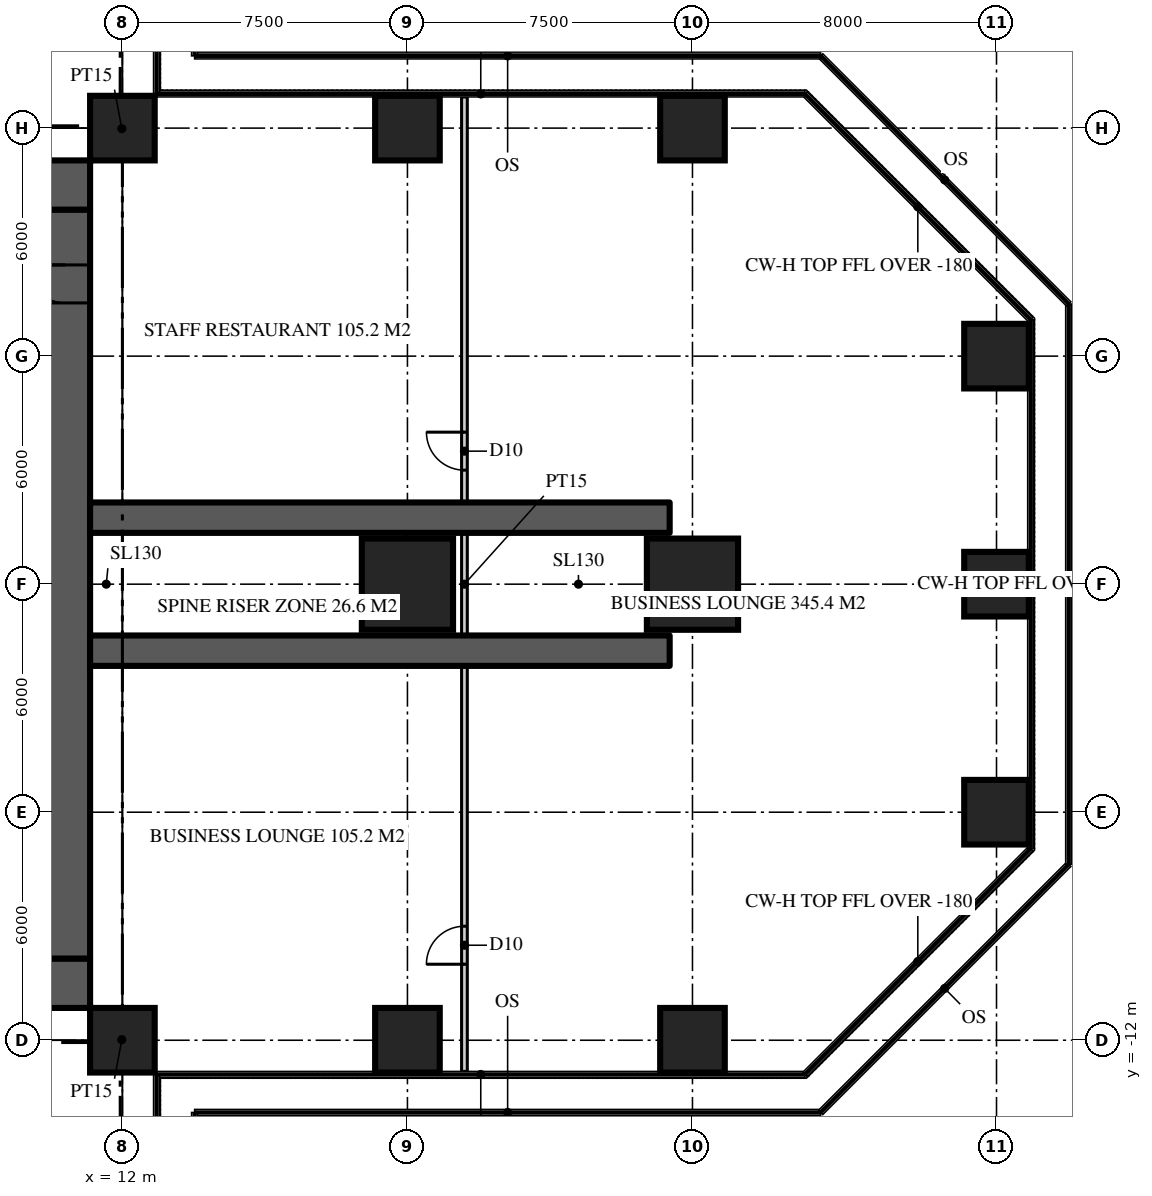
"""IFC4 building model, lengths in metres.
Left out: names, types, materials, properties, quantities, classifications, styles, units other than length and angle.
Written with IfcOpenShell. Run it as: python <this file> out.ifc"""

import sys

from ifc_helpers import new_model, si_unit, direction, frame, frame_2d, origin, origin_2d, place, context, subcontext, project, spatial, rectangle, extrude, element, fill, save


model = new_model("IFC4")
c1 = context("Model", 3, precision=1e-05, world=origin(), true_north=direction((0.0, 1.0)))
c2 = subcontext(c1, "Body", "Model", "MODEL_VIEW")
j1 = project(units=[si_unit("LENGTHUNIT", "METRE"), si_unit("PLANEANGLEUNIT", "RADIAN")], contexts=[c1])
p1 = place(None, origin())
s1 = spatial("IfcSite", under=j1, at=p1, CompositionType="ELEMENT")
p2 = place(p1, origin())
s2 = spatial("IfcBuilding", under=s1, at=p2, CompositionType="ELEMENT")
p3 = place(p2, frame((0.0, 0.0, 194.4)))
s3 = spatial("IfcBuildingStorey", under=s2, at=p3, CompositionType="ELEMENT", Elevation=194.4)
p4 = place(p3, frame((-11.15, 10.5, 0.0), z_axis=(0.0, 0.0, 1.0), x_axis=(1.0, 0.0, 0.0)))
e1 = element("IfcWall", 1, at=p4, inside=s3, PredefinedType="SHEAR", context=c2, shape_type="SweptSolid", body=[
    extrude(rectangle(XDim=22.3, YDim=1.3, at=frame_2d((11.15, 0.0))), origin(), (0.0, 0.0, 1.0), 4.5),
])
p5 = place(p4, frame((4.25, 0.0, 0.0)))
e2 = element("IfcOpeningElement", 2, at=p5, cuts=e1, PredefinedType="OPENING", context=c2, shape_type="SweptSolid", body=[
    extrude(rectangle(XDim=1.8, YDim=2.2, at=frame_2d((0.9, 1.1))), frame((0.0, 0.66, 0.0), z_axis=(0.0, -1.0, 0.0), x_axis=(1.0, 0.0, 0.0)), (0.0, 0.0, 1.0), 1.32),
])
p6 = place(p4, frame((16.25, 0.0, 0.0)))
e3 = element("IfcOpeningElement", 3, at=p6, cuts=e1, PredefinedType="OPENING", context=c2, shape_type="SweptSolid", body=[
    extrude(rectangle(XDim=1.8, YDim=2.2, at=frame_2d((0.9, 1.1))), frame((0.0, 0.66, 0.0), z_axis=(0.0, -1.0, 0.0), x_axis=(1.0, 0.0, 0.0)), (0.0, 0.0, 1.0), 1.32),
])
p7 = place(p3, frame((11.15, -10.5, 0.0), z_axis=(0.0, 0.0, 1.0), x_axis=(-1.0, 0.0, 0.0)))
e4 = element("IfcWall", 4, at=p7, inside=s3, PredefinedType="SHEAR", context=c2, shape_type="SweptSolid", body=[
    extrude(rectangle(XDim=22.3, YDim=1.3, at=frame_2d((11.15, 0.0))), origin(), (0.0, 0.0, 1.0), 4.5),
])
p8 = place(p7, frame((16.25, 0.0, 0.0)))
e5 = element("IfcOpeningElement", 5, at=p8, cuts=e4, PredefinedType="OPENING", context=c2, shape_type="SweptSolid", body=[
    extrude(rectangle(XDim=1.8, YDim=2.2, at=frame_2d((0.9, 1.1))), frame((0.0, 0.66, 0.0), z_axis=(0.0, -1.0, 0.0), x_axis=(1.0, 0.0, 0.0)), (0.0, 0.0, 1.0), 1.32),
])
p9 = place(p7, frame((4.25, 0.0, 0.0)))
e6 = element("IfcOpeningElement", 6, at=p9, cuts=e4, PredefinedType="OPENING", context=c2, shape_type="SweptSolid", body=[
    extrude(rectangle(XDim=1.8, YDim=2.2, at=frame_2d((0.9, 1.1))), frame((0.0, 0.66, 0.0), z_axis=(0.0, -1.0, 0.0), x_axis=(1.0, 0.0, 0.0)), (0.0, 0.0, 1.0), 1.32),
])
p10 = place(p3, frame((10.5, -9.85, 0.0), z_axis=(0.0, 0.0, 1.0), x_axis=(0.0, 1.0, 0.0)))
e7 = element("IfcWall", 7, at=p10, inside=s3, PredefinedType="SHEAR", context=c2, shape_type="SweptSolid", body=[
    extrude(rectangle(XDim=19.7, YDim=1.3, at=frame_2d((9.85, 0.0))), origin(), (0.0, 0.0, 1.0), 4.5),
])
p11 = place(p10, frame((17.25, 0.0, 0.0)))
e8 = element("IfcOpeningElement", 8, at=p11, cuts=e7, PredefinedType="OPENING", context=c2, shape_type="SweptSolid", body=[
    extrude(rectangle(XDim=1.0, YDim=2.2, at=frame_2d((0.5, 1.1))), frame((0.0, 0.66, 0.0), z_axis=(0.0, -1.0, 0.0), x_axis=(1.0, 0.0, 0.0)), (0.0, 0.0, 1.0), 1.32),
])
for number, where, z_axis, x_axis in (
    (9, (11.15, -1.75, 0.0), (0.0, 0.0, 1.0), (1.0, 0.0, 0.0)),
    (10, (11.15, 1.75, 0.0), (0.0, 0.0, 1.0), (1.0, 0.0, 0.0)),
):
    element("IfcWall", number, at=place(p3, frame(where, z_axis=z_axis, x_axis=x_axis)), inside=s3, PredefinedType="SHEAR", context=c2, shape_type="SweptSolid", body=[
        extrude(rectangle(XDim=15.25, YDim=0.8, at=frame_2d((7.625, 0.0))), origin(), (0.0, 0.0, 1.0), 4.5),
    ])
for number, where, z_axis, x_axis in (
    (11, (12.0, -12.0, 0.0), (0.0, 0.0, 1.0), (1.0, 0.0, 0.0)),
    (12, (19.5, -12.0, 0.0), (0.0, 0.0, 1.0), (1.0, 0.0, 0.0)),
    (13, (27.0, -12.0, 0.0), (0.0, 0.0, 1.0), (1.0, 0.0, 0.0)),
    (14, (35.0, -6.0, 0.0), (0.0, 0.0, 1.0), (1.0, 0.0, 0.0)),
):
    element("IfcColumn", number, at=place(p3, frame(where, z_axis=z_axis, x_axis=x_axis)), inside=s3, PredefinedType="COLUMN", context=c2, shape_type="SweptSolid", body=[
        extrude(rectangle(XDim=1.7, YDim=1.7, at=origin_2d()), origin(), (0.0, 0.0, 1.0), 4.5),
    ])
for number, where, z_axis, x_axis in (
    (15, (19.5, 0.0, 0.0), (0.0, 0.0, 1.0), (1.0, 0.0, 0.0)),
    (16, (27.0, 0.0, 0.0), (0.0, 0.0, 1.0), (1.0, 0.0, 0.0)),
):
    element("IfcColumn", number, at=place(p3, frame(where, z_axis=z_axis, x_axis=x_axis)), inside=s3, PredefinedType="COLUMN", context=c2, shape_type="SweptSolid", body=[
        extrude(rectangle(XDim=2.4, YDim=2.4, at=origin_2d()), origin(), (0.0, 0.0, 1.0), 4.5),
    ])
for number, where, z_axis, x_axis in (
    (17, (35.0, 0.0, 0.0), (0.0, 0.0, 1.0), (1.0, 0.0, 0.0)),
    (18, (35.0, 6.0, 0.0), (0.0, 0.0, 1.0), (1.0, 0.0, 0.0)),
    (19, (12.0, 12.0, 0.0), (0.0, 0.0, 1.0), (1.0, 0.0, 0.0)),
    (20, (19.5, 12.0, 0.0), (0.0, 0.0, 1.0), (1.0, 0.0, 0.0)),
    (21, (27.0, 12.0, 0.0), (0.0, 0.0, 1.0), (1.0, 0.0, 0.0)),
):
    element("IfcColumn", number, at=place(p3, frame(where, z_axis=z_axis, x_axis=x_axis)), inside=s3, PredefinedType="COLUMN", context=c2, shape_type="SweptSolid", body=[
        extrude(rectangle(XDim=1.7, YDim=1.7, at=origin_2d()), origin(), (0.0, 0.0, 1.0), 4.5),
    ])
p12 = place(p3, frame((21.0, -12.82, 0.0), z_axis=(0.0, 0.0, 1.0), x_axis=(0.0, 1.0, 0.0)))
e22 = element("IfcWall", 22, at=p12, inside=s3, PredefinedType="PARTITIONING", context=c2, shape_type="SweptSolid", body=[
    extrude(rectangle(XDim=25.64, YDim=0.15, at=frame_2d((12.82, 0.0))), origin(), (0.0, 0.0, 1.0), 4.32),
])
p13 = place(p12, frame((15.82, 0.0, 0.0)))
e23 = element("IfcOpeningElement", 23, at=p13, cuts=e22, PredefinedType="OPENING", context=c2, shape_type="SweptSolid", body=[
    extrude(rectangle(XDim=1.0, YDim=2.2, at=frame_2d((0.5, 1.1))), frame((0.0, 0.085, 0.0), z_axis=(0.0, -1.0, 0.0), x_axis=(1.0, 0.0, 0.0)), (0.0, 0.0, 1.0), 0.17),
])
p14 = place(p12, frame((2.82, 0.0, 0.0)))
e24 = element("IfcOpeningElement", 24, at=p14, cuts=e22, PredefinedType="OPENING", context=c2, shape_type="SweptSolid", body=[
    extrude(rectangle(XDim=1.0, YDim=2.2, at=frame_2d((0.5, 1.1))), frame((0.0, 0.085, 0.0), z_axis=(0.0, -1.0, 0.0), x_axis=(1.0, 0.0, 0.0)), (0.0, 0.0, 1.0), 0.17),
])
for number, where, z_axis, x_axis in (
    (25, (11.15, 11.15, 0.0), (0.0, 0.0, 1.0), (0.707, 0.707, 0.0)),
    (26, (11.15, -11.15, 0.0), (0.0, 0.0, 1.0), (0.707, -0.707, 0.0)),
):
    element("IfcWall", number, at=place(p3, frame(where, z_axis=z_axis, x_axis=x_axis)), inside=s3, PredefinedType="PARTITIONING", context=c2, shape_type="SweptSolid", body=[
        extrude(rectangle(XDim=2.362, YDim=0.15, at=frame_2d((1.181, 0.0))), origin(), (0.0, 0.0, 1.0), 4.32),
    ])
p15 = place(p11, origin())
e27 = element("IfcDoor", 27, at=p15, inside=s3, OperationType="SINGLE_SWING_RIGHT", PredefinedType="DOOR", context=c2, shape_type="SweptSolid", body=[
    extrude(rectangle(XDim=1.0, YDim=2.2, at=frame_2d((0.5, 1.1))), frame((0.0, 0.025, 0.0), z_axis=(0.0, -1.0, 0.0), x_axis=(1.0, 0.0, 0.0)), (0.0, 0.0, 1.0), 0.05),
])
fill(e8, e27)
p16 = place(p13, origin())
e28 = element("IfcDoor", 28, at=p16, inside=s3, OperationType="SINGLE_SWING_RIGHT", PredefinedType="DOOR", context=c2, shape_type="SweptSolid", body=[
    extrude(rectangle(XDim=1.0, YDim=2.2, at=frame_2d((0.5, 1.1))), frame((0.0, 0.025, 0.0), z_axis=(0.0, -1.0, 0.0), x_axis=(1.0, 0.0, 0.0)), (0.0, 0.0, 1.0), 0.05),
])
fill(e23, e28)
p17 = place(p14, origin())
e29 = element("IfcDoor", 29, at=p17, inside=s3, OperationType="SINGLE_SWING_LEFT", PredefinedType="DOOR", context=c2, shape_type="SweptSolid", body=[
    extrude(rectangle(XDim=1.0, YDim=2.2, at=frame_2d((0.5, 1.1))), frame((0.0, 0.025, 0.0), z_axis=(0.0, -1.0, 0.0), x_axis=(1.0, 0.0, 0.0)), (0.0, 0.0, 1.0), 0.05),
])
fill(e24, e29)
save(model, sys.argv[1])
